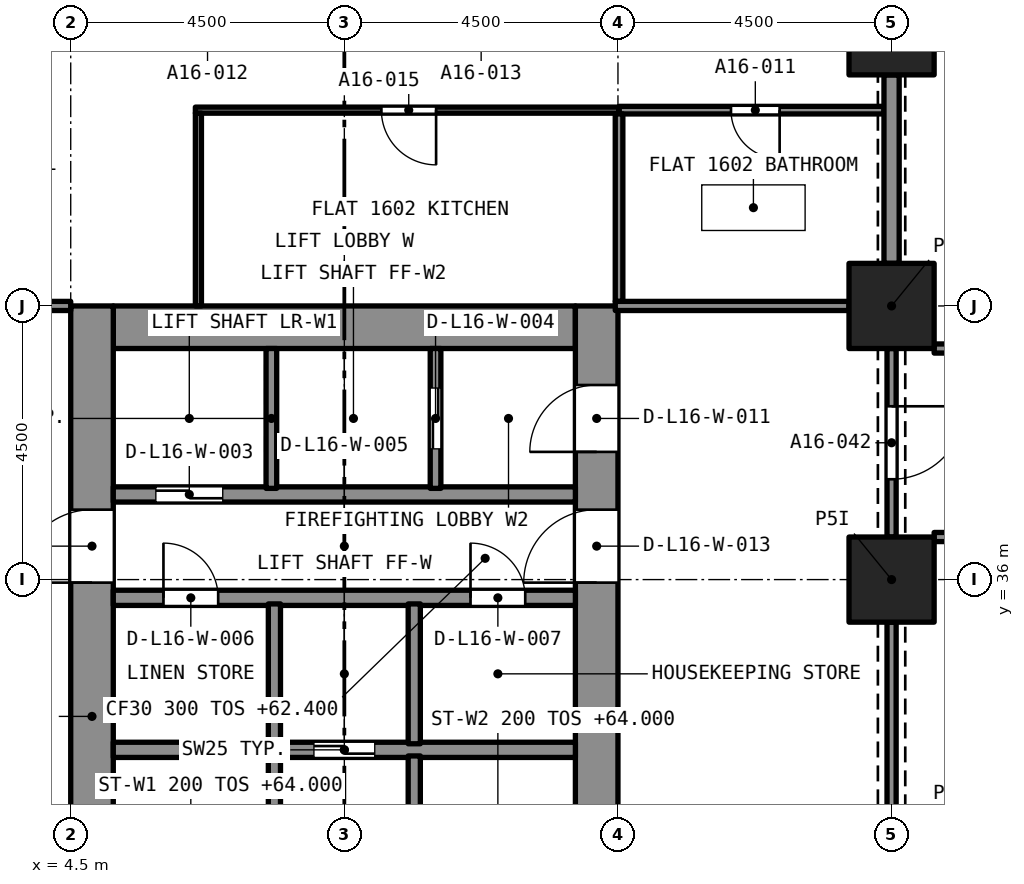
"""IFC4 building model, lengths in metres.
Left out: names, types, materials, properties, quantities, classifications, styles, units other than length and angle.
Written with IfcOpenShell. Run it as: python <this file> out.ifc"""

import sys

from ifc_helpers import new_model, si_unit, direction, frame, frame_2d, origin, origin_2d, place, context, subcontext, project, spatial, rectangle, extrude, element, fill, save


model = new_model("IFC4")
c1 = context("Model", 3, precision=1e-05, world=origin(), true_north=direction((0.0, 1.0)))
c2 = subcontext(c1, "Body", "Model", "MODEL_VIEW")
j1 = project(units=[si_unit("LENGTHUNIT", "METRE"), si_unit("PLANEANGLEUNIT", "RADIAN")], contexts=[c1])
p1 = place(None, origin())
s1 = spatial("IfcSite", under=j1, at=p1, CompositionType="ELEMENT")
p2 = place(p1, origin())
s2 = spatial("IfcBuilding", under=s1, at=p2, CompositionType="ELEMENT")
p3 = place(p2, frame((0.0, 0.0, 62.4)))
s3 = spatial("IfcBuildingStorey", under=s2, at=p3, CompositionType="ELEMENT", Elevation=62.4)
for number, where, z_axis, x_axis in (
    (1, (18.0, 36.0, 0.0), (0.0, 0.0, 1.0), (1.0, 0.0, 0.0)),
    (2, (18.0, 40.5, 0.0), (0.0, 0.0, 1.0), (1.0, 0.0, 0.0)),
    (3, (18.0, 45.0, 0.0), (0.0, 0.0, 1.0), (1.0, 0.0, 0.0)),
):
    element("IfcColumn", number, at=place(p3, frame(where, z_axis=z_axis, x_axis=x_axis)), inside=s3, PredefinedType="COLUMN", context=c2, shape_type="SweptSolid", body=[
        extrude(rectangle(XDim=1.4, YDim=1.4, at=origin_2d()), origin(), (0.0, 0.0, 1.0), 3.2),
    ])
p4 = place(p3, frame((5.2, 40.15, 0.0), z_axis=(0.0, 0.0, 1.0), x_axis=(1.0, 0.0, 0.0)))
e4 = element("IfcWall", 4, at=p4, inside=s3, PredefinedType="SOLIDWALL", context=c2, shape_type="SweptSolid", body=[
    extrude(rectangle(XDim=7.6, YDim=0.7, at=frame_2d((3.8, 0.0))), origin(), (0.0, 0.0, 1.0), 3.2),
])
p5 = place(p3, frame((4.85, 27.0, 0.0), z_axis=(0.0, 0.0, 1.0), x_axis=(0.0, 1.0, 0.0)))
e5 = element("IfcWall", 5, at=p5, inside=s3, PredefinedType="SOLIDWALL", context=c2, shape_type="SweptSolid", body=[
    extrude(rectangle(XDim=13.5, YDim=0.7, at=frame_2d((6.75, 0.0))), origin(), (0.0, 0.0, 1.0), 3.2),
])
p6 = place(p5, frame((8.95, 0.0, 0.0)))
e6 = element("IfcOpeningElement", 6, at=p6, cuts=e5, PredefinedType="OPENING", context=c2, shape_type="SweptSolid", body=[
    extrude(rectangle(XDim=1.2, YDim=2.1, at=frame_2d((0.6, 1.05))), frame((0.0, 0.36, 0.0), z_axis=(0.0, -1.0, 0.0), x_axis=(1.0, 0.0, 0.0)), (0.0, 0.0, 1.0), 0.72),
])
p7 = place(p3, frame((13.15, 27.0, 0.0), z_axis=(0.0, 0.0, 1.0), x_axis=(0.0, 1.0, 0.0)))
e7 = element("IfcWall", 7, at=p7, inside=s3, PredefinedType="SOLIDWALL", context=c2, shape_type="SweptSolid", body=[
    extrude(rectangle(XDim=13.5, YDim=0.7, at=frame_2d((6.75, 0.0))), origin(), (0.0, 0.0, 1.0), 3.2),
])
p8 = place(p7, frame((11.1, 0.0, 0.0)))
e8 = element("IfcOpeningElement", 8, at=p8, cuts=e7, PredefinedType="OPENING", context=c2, shape_type="SweptSolid", body=[
    extrude(rectangle(XDim=1.1, YDim=2.1, at=frame_2d((0.55, 1.05))), frame((0.0, 0.36, 0.0), z_axis=(0.0, -1.0, 0.0), x_axis=(1.0, 0.0, 0.0)), (0.0, 0.0, 1.0), 0.72),
])
p9 = place(p7, frame((8.95, 0.0, 0.0)))
e9 = element("IfcOpeningElement", 9, at=p9, cuts=e7, PredefinedType="OPENING", context=c2, shape_type="SweptSolid", body=[
    extrude(rectangle(XDim=1.2, YDim=2.1, at=frame_2d((0.6, 1.05))), frame((0.0, 0.36, 0.0), z_axis=(0.0, -1.0, 0.0), x_axis=(1.0, 0.0, 0.0)), (0.0, 0.0, 1.0), 0.72),
])
p10 = place(p3, frame((17.875, 43.72, 0.0), z_axis=(0.0, 0.0, 1.0), x_axis=(-1.0, 0.0, 0.0)))
e10 = element("IfcWall", 10, at=p10, inside=s3, PredefinedType="PARTITIONING", context=c2, shape_type="SweptSolid", body=[
    extrude(rectangle(XDim=4.357, YDim=0.125, at=frame_2d((2.178, 0.0))), origin(), (0.0, 0.0, 1.0), 2.9),
])
p11 = place(p10, frame((1.716, 0.0, 0.0)))
e11 = element("IfcOpeningElement", 11, at=p11, cuts=e10, PredefinedType="OPENING", context=c2, shape_type="SweptSolid", body=[
    extrude(rectangle(XDim=0.8, YDim=2.1, at=frame_2d((0.4, 1.05))), frame((0.0, 0.073, 0.0), z_axis=(0.0, -1.0, 0.0), x_axis=(1.0, 0.0, 0.0)), (0.0, 0.0, 1.0), 0.145),
])
p12 = place(p3, frame((13.518, 40.575, 0.0), z_axis=(0.0, 0.0, 1.0), x_axis=(0.0, 1.0, 0.0)))
e12 = element("IfcWall", 12, at=p12, inside=s3, PredefinedType="PARTITIONING", context=c2, shape_type="SweptSolid", body=[
    extrude(rectangle(XDim=3.083, YDim=0.125, at=frame_2d((1.541, 0.0))), origin(), (0.0, 0.0, 1.0), 2.9),
])
p13 = place(p3, frame((18.0, 41.2, 0.0), z_axis=(0.0, 0.0, 1.0), x_axis=(0.0, 1.0, 0.0)))
e13 = element("IfcWall", 13, at=p13, inside=s3, PredefinedType="PARTITIONING", context=c2, shape_type="SweptSolid", body=[
    extrude(rectangle(XDim=3.1, YDim=0.25, at=frame_2d((1.55, 0.0))), origin(), (0.0, 0.0, 1.0), 2.38),
])
p14 = place(p3, frame((13.456, 40.5, 0.0), z_axis=(0.0, 0.0, 1.0), x_axis=(1.0, 0.0, 0.0)))
e14 = element("IfcWall", 14, at=p14, inside=s3, PredefinedType="PARTITIONING", context=c2, shape_type="SweptSolid", body=[
    extrude(rectangle(XDim=3.844, YDim=0.15, at=frame_2d((1.922, 0.0))), origin(), (0.0, 0.0, 1.0), 2.9),
])
p15 = place(p3, frame((13.518, 43.72, 0.0), z_axis=(0.0, 0.0, 1.0), x_axis=(-1.0, 0.0, 0.0)))
e15 = element("IfcWall", 15, at=p15, inside=s3, PredefinedType="PARTITIONING", context=c2, shape_type="SweptSolid", body=[
    extrude(rectangle(XDim=6.968, YDim=0.1, at=frame_2d((3.484, 0.0))), origin(), (0.0, 0.0, 1.0), 2.9),
])
p16 = place(p15, frame((3.009, 0.0, 0.0)))
e16 = element("IfcOpeningElement", 16, at=p16, cuts=e15, PredefinedType="OPENING", context=c2, shape_type="SweptSolid", body=[
    extrude(rectangle(XDim=0.9, YDim=2.1, at=frame_2d((0.45, 1.05))), frame((0.0, 0.06, 0.0), z_axis=(0.0, -1.0, 0.0), x_axis=(1.0, 0.0, 0.0)), (0.0, 0.0, 1.0), 0.12),
])
p17 = place(p3, frame((6.6, 40.5, 0.0), z_axis=(0.0, 0.0, 1.0), x_axis=(0.0, 1.0, 0.0)))
e17 = element("IfcWall", 17, at=p17, inside=s3, PredefinedType="PARTITIONING", context=c2, shape_type="SweptSolid", body=[
    extrude(rectangle(XDim=3.17, YDim=0.1, at=frame_2d((1.585, 0.0))), origin(), (0.0, 0.0, 1.0), 2.9),
])
p18 = place(p3, frame((0.7, 40.5, 0.0), z_axis=(0.0, 0.0, 1.0), x_axis=(1.0, 0.0, 0.0)))
e18 = element("IfcWall", 18, at=p18, inside=s3, PredefinedType="PARTITIONING", context=c2, shape_type="SweptSolid", body=[
    extrude(rectangle(XDim=3.8, YDim=0.15, at=frame_2d((1.9, 0.0))), origin(), (0.0, 0.0, 1.0), 2.9),
])
p19 = place(p18, frame((1.05, 0.0, 0.0)))
e19 = element("IfcOpeningElement", 19, at=p19, cuts=e18, PredefinedType="OPENING", context=c2, shape_type="SweptSolid", body=[
    extrude(rectangle(XDim=1.0, YDim=2.1, at=frame_2d((0.5, 1.05))), frame((0.0, 0.085, 0.0), z_axis=(0.0, -1.0, 0.0), x_axis=(1.0, 0.0, 0.0)), (0.0, 0.0, 1.0), 0.17),
])
p20 = place(p3, frame((18.7, 39.8, 0.0), z_axis=(0.0, 0.0, 1.0), x_axis=(1.0, 0.0, 0.0)))
e20 = element("IfcWall", 20, at=p20, inside=s3, PredefinedType="PARTITIONING", context=c2, shape_type="SweptSolid", body=[
    extrude(rectangle(XDim=8.3, YDim=0.15, at=frame_2d((4.15, 0.0))), origin(), (0.0, 0.0, 1.0), 2.75),
])
p21 = place(p20, frame((3.3, 0.0, 0.0)))
e21 = element("IfcOpeningElement", 21, at=p21, cuts=e20, PredefinedType="OPENING", context=c2, shape_type="SweptSolid", body=[
    extrude(rectangle(XDim=1.0, YDim=2.1, at=frame_2d((0.5, 1.05))), frame((0.0, 0.085, 0.0), z_axis=(0.0, -1.0, 0.0), x_axis=(1.0, 0.0, 0.0)), (0.0, 0.0, 1.0), 0.17),
])
p22 = place(p3, frame((30.8, 36.7, 0.0), z_axis=(0.0, 0.0, 1.0), x_axis=(-1.0, 0.0, 0.0)))
e22 = element("IfcWall", 22, at=p22, inside=s3, PredefinedType="PARTITIONING", context=c2, shape_type="SweptSolid", body=[
    extrude(rectangle(XDim=12.1, YDim=0.15, at=frame_2d((6.05, 0.0))), origin(), (0.0, 0.0, 1.0), 2.75),
])
p23 = place(p22, frame((5.55, 0.0, 0.0)))
e23 = element("IfcOpeningElement", 23, at=p23, cuts=e22, PredefinedType="OPENING", context=c2, shape_type="SweptSolid", body=[
    extrude(rectangle(XDim=1.0, YDim=2.1, at=frame_2d((0.5, 1.05))), frame((0.0, 0.085, 0.0), z_axis=(0.0, -1.0, 0.0), x_axis=(1.0, 0.0, 0.0)), (0.0, 0.0, 1.0), 0.17),
])
p24 = place(p3, frame((18.0, 39.8, 0.0), z_axis=(0.0, 0.0, 1.0), x_axis=(0.0, -1.0, 0.0)))
e24 = element("IfcWall", 24, at=p24, inside=s3, PredefinedType="PARTITIONING", context=c2, shape_type="SweptSolid", body=[
    extrude(rectangle(XDim=3.1, YDim=0.15, at=frame_2d((1.55, 0.0))), origin(), (0.0, 0.0, 1.0), 2.38),
])
p25 = place(p24, frame((0.95, 0.0, 0.0)))
e25 = element("IfcOpeningElement", 25, at=p25, cuts=e24, PredefinedType="OPENING", context=c2, shape_type="SweptSolid", body=[
    extrude(rectangle(XDim=1.2, YDim=2.1, at=frame_2d((0.6, 1.05))), frame((0.0, 0.085, 0.0), z_axis=(0.0, -1.0, 0.0), x_axis=(1.0, 0.0, 0.0)), (0.0, 0.0, 1.0), 0.17),
])
p26 = place(p3, frame((18.0, 32.2, 0.0), z_axis=(0.0, 0.0, 1.0), x_axis=(0.0, 1.0, 0.0)))
e26 = element("IfcWall", 26, at=p26, inside=s3, PredefinedType="PARTITIONING", context=c2, shape_type="SweptSolid", body=[
    extrude(rectangle(XDim=3.1, YDim=0.15, at=frame_2d((1.55, 0.0))), origin(), (0.0, 0.0, 1.0), 2.38),
])
p27 = place(p3, frame((5.2, 33.2, 0.0), z_axis=(0.0, 0.0, 1.0), x_axis=(1.0, 0.0, 0.0)))
e27 = element("IfcWall", 27, at=p27, inside=s3, PredefinedType="SOLIDWALL", context=c2, shape_type="SweptSolid", body=[
    extrude(rectangle(XDim=7.6, YDim=0.25, at=frame_2d((3.8, 0.0))), origin(), (0.0, 0.0, 1.0), 2.9),
])
p28 = place(p27, frame((3.3, 0.0, 0.0)))
e28 = element("IfcOpeningElement", 28, at=p28, cuts=e27, PredefinedType="OPENING", context=c2, shape_type="SweptSolid", body=[
    extrude(rectangle(XDim=1.0, YDim=2.1, at=frame_2d((0.5, 1.05))), frame((0.0, 0.135, 0.0), z_axis=(0.0, -1.0, 0.0), x_axis=(1.0, 0.0, 0.0)), (0.0, 0.0, 1.0), 0.27),
])
p29 = place(p3, frame((5.2, 35.7, 0.0), z_axis=(0.0, 0.0, 1.0), x_axis=(1.0, 0.0, 0.0)))
e29 = element("IfcWall", 29, at=p29, inside=s3, PredefinedType="SOLIDWALL", context=c2, shape_type="SweptSolid", body=[
    extrude(rectangle(XDim=7.6, YDim=0.25, at=frame_2d((3.8, 0.0))), origin(), (0.0, 0.0, 1.0), 2.9),
])
p30 = place(p29, frame((0.825, 0.0, 0.0)))
e30 = element("IfcOpeningElement", 30, at=p30, cuts=e29, PredefinedType="OPENING", context=c2, shape_type="SweptSolid", body=[
    extrude(rectangle(XDim=0.9, YDim=2.1, at=frame_2d((0.45, 1.05))), frame((0.0, 0.135, 0.0), z_axis=(0.0, -1.0, 0.0), x_axis=(1.0, 0.0, 0.0)), (0.0, 0.0, 1.0), 0.27),
])
p31 = place(p29, frame((5.875, 0.0, 0.0)))
e31 = element("IfcOpeningElement", 31, at=p31, cuts=e29, PredefinedType="OPENING", context=c2, shape_type="SweptSolid", body=[
    extrude(rectangle(XDim=0.9, YDim=2.1, at=frame_2d((0.45, 1.05))), frame((0.0, 0.135, 0.0), z_axis=(0.0, -1.0, 0.0), x_axis=(1.0, 0.0, 0.0)), (0.0, 0.0, 1.0), 0.27),
])
p32 = place(p3, frame((5.2, 37.4, 0.0), z_axis=(0.0, 0.0, 1.0), x_axis=(1.0, 0.0, 0.0)))
e32 = element("IfcWall", 32, at=p32, inside=s3, PredefinedType="SOLIDWALL", context=c2, shape_type="SweptSolid", body=[
    extrude(rectangle(XDim=7.6, YDim=0.25, at=frame_2d((3.8, 0.0))), origin(), (0.0, 0.0, 1.0), 2.9),
])
p33 = place(p32, frame((0.7, 0.0, 0.0)))
e33 = element("IfcOpeningElement", 33, at=p33, cuts=e32, PredefinedType="OPENING", context=c2, shape_type="SweptSolid", body=[
    extrude(rectangle(XDim=1.1, YDim=2.4, at=frame_2d((0.55, 1.2))), frame((0.0, 0.135, 0.0), z_axis=(0.0, -1.0, 0.0), x_axis=(1.0, 0.0, 0.0)), (0.0, 0.0, 1.0), 0.27),
])
p34 = place(p3, frame((7.85, 27.7, 0.0), z_axis=(0.0, 0.0, 1.0), x_axis=(0.0, 1.0, 0.0)))
e34 = element("IfcWall", 34, at=p34, inside=s3, PredefinedType="SOLIDWALL", context=c2, shape_type="SweptSolid", body=[
    extrude(rectangle(XDim=5.4, YDim=0.2, at=frame_2d((2.7, 0.0))), origin(), (0.0, 0.0, 1.0), 2.9),
])
p35 = place(p34, frame((0.2, 0.0, 0.0)))
e35 = element("IfcOpeningElement", 35, at=p35, cuts=e34, PredefinedType="OPENING", context=c2, shape_type="SweptSolid", body=[
    extrude(rectangle(XDim=0.9, YDim=2.1, at=frame_2d((0.45, 1.05))), frame((0.0, 0.11, 0.0), z_axis=(0.0, -1.0, 0.0), x_axis=(1.0, 0.0, 0.0)), (0.0, 0.0, 1.0), 0.22),
])
p36 = place(p3, frame((10.15, 27.7, 0.0), z_axis=(0.0, 0.0, 1.0), x_axis=(0.0, 1.0, 0.0)))
e36 = element("IfcWall", 36, at=p36, inside=s3, PredefinedType="SOLIDWALL", context=c2, shape_type="SweptSolid", body=[
    extrude(rectangle(XDim=5.4, YDim=0.2, at=frame_2d((2.7, 0.0))), origin(), (0.0, 0.0, 1.0), 2.9),
])
p37 = place(p36, frame((0.2, 0.0, 0.0)))
e37 = element("IfcOpeningElement", 37, at=p37, cuts=e36, PredefinedType="OPENING", context=c2, shape_type="SweptSolid", body=[
    extrude(rectangle(XDim=0.9, YDim=2.1, at=frame_2d((0.45, 1.05))), frame((0.0, 0.11, 0.0), z_axis=(0.0, -1.0, 0.0), x_axis=(1.0, 0.0, 0.0)), (0.0, 0.0, 1.0), 0.22),
])
for number, where, z_axis, x_axis in (
    (38, (7.85, 33.3, 0.0), (0.0, 0.0, 1.0), (0.0, 1.0, 0.0)),
    (39, (10.15, 33.3, 0.0), (0.0, 0.0, 1.0), (0.0, 1.0, 0.0)),
):
    element("IfcWall", number, at=place(p3, frame(where, z_axis=z_axis, x_axis=x_axis)), inside=s3, PredefinedType="SOLIDWALL", context=c2, shape_type="SweptSolid", body=[
        extrude(rectangle(XDim=2.3, YDim=0.2, at=frame_2d((1.15, 0.0))), origin(), (0.0, 0.0, 1.0), 2.9),
    ])
p38 = place(p3, frame((7.8, 37.5, 0.0), z_axis=(0.0, 0.0, 1.0), x_axis=(0.0, 1.0, 0.0)))
e40 = element("IfcWall", 40, at=p38, inside=s3, PredefinedType="SOLIDWALL", context=c2, shape_type="SweptSolid", body=[
    extrude(rectangle(XDim=2.3, YDim=0.175, at=frame_2d((1.15, 0.0))), origin(), (0.0, 0.0, 1.0), 2.9),
])
p39 = place(p3, frame((10.5, 37.5, 0.0), z_axis=(0.0, 0.0, 1.0), x_axis=(0.0, 1.0, 0.0)))
e41 = element("IfcWall", 41, at=p39, inside=s3, PredefinedType="SOLIDWALL", context=c2, shape_type="SweptSolid", body=[
    extrude(rectangle(XDim=2.3, YDim=0.175, at=frame_2d((1.15, 0.0))), origin(), (0.0, 0.0, 1.0), 2.9),
])
p40 = place(p39, frame((0.65, 0.0, 0.0)))
e42 = element("IfcOpeningElement", 42, at=p40, cuts=e41, PredefinedType="OPENING", context=c2, shape_type="SweptSolid", body=[
    extrude(rectangle(XDim=1.0, YDim=2.1, at=frame_2d((0.5, 1.05))), frame((0.0, 0.097, 0.0), z_axis=(0.0, -1.0, 0.0), x_axis=(1.0, 0.0, 0.0)), (0.0, 0.0, 1.0), 0.195),
])
p41 = place(p11, origin())
e43 = element("IfcDoor", 43, at=p41, inside=s3, OperationType="SINGLE_SWING_LEFT", PredefinedType="DOOR", context=c2, shape_type="SweptSolid", body=[
    extrude(rectangle(XDim=0.8, YDim=2.1, at=frame_2d((0.4, 1.05))), frame((0.0, 0.025, 0.0), z_axis=(0.0, -1.0, 0.0), x_axis=(1.0, 0.0, 0.0)), (0.0, 0.0, 1.0), 0.05),
])
fill(e11, e43)
p42 = place(p16, origin())
e44 = element("IfcDoor", 44, at=p42, inside=s3, OperationType="SINGLE_SWING_LEFT", PredefinedType="DOOR", context=c2, shape_type="SweptSolid", body=[
    extrude(rectangle(XDim=0.9, YDim=2.1, at=frame_2d((0.45, 1.05))), frame((0.0, 0.025, 0.0), z_axis=(0.0, -1.0, 0.0), x_axis=(1.0, 0.0, 0.0)), (0.0, 0.0, 1.0), 0.05),
])
fill(e16, e44)
p43 = place(p25, origin())
e45 = element("IfcDoor", 45, at=p43, inside=s3, OperationType="SINGLE_SWING_LEFT", PredefinedType="DOOR", context=c2, shape_type="SweptSolid", body=[
    extrude(rectangle(XDim=1.2, YDim=2.1, at=frame_2d((0.6, 1.05))), frame((0.0, 0.025, 0.0), z_axis=(0.0, -1.0, 0.0), x_axis=(1.0, 0.0, 0.0)), (0.0, 0.0, 1.0), 0.05),
])
fill(e25, e45)
p44 = place(p33, origin())
e46 = element("IfcDoor", 46, at=p44, inside=s3, OperationType="SLIDING_TO_LEFT", PredefinedType="DOOR", context=c2, shape_type="SweptSolid", body=[
    extrude(rectangle(XDim=1.1, YDim=2.4, at=frame_2d((0.55, 1.2))), frame((0.0, 0.025, 0.0), z_axis=(0.0, -1.0, 0.0), x_axis=(1.0, 0.0, 0.0)), (0.0, 0.0, 1.0), 0.05),
])
fill(e33, e46)
p45 = place(p40, origin())
e47 = element("IfcDoor", 47, at=p45, inside=s3, OperationType="SLIDING_TO_LEFT", PredefinedType="DOOR", context=c2, shape_type="SweptSolid", body=[
    extrude(rectangle(XDim=1.0, YDim=2.1, at=frame_2d((0.5, 1.05))), frame((0.0, 0.025, 0.0), z_axis=(0.0, -1.0, 0.0), x_axis=(1.0, 0.0, 0.0)), (0.0, 0.0, 1.0), 0.05),
])
fill(e42, e47)
p46 = place(p28, origin())
e48 = element("IfcDoor", 48, at=p46, inside=s3, OperationType="SLIDING_TO_LEFT", PredefinedType="DOOR", context=c2, shape_type="SweptSolid", body=[
    extrude(rectangle(XDim=1.0, YDim=2.1, at=frame_2d((0.5, 1.05))), frame((0.0, 0.025, 0.0), z_axis=(0.0, -1.0, 0.0), x_axis=(1.0, 0.0, 0.0)), (0.0, 0.0, 1.0), 0.05),
])
fill(e28, e48)
p47 = place(p30, origin())
e49 = element("IfcDoor", 49, at=p47, inside=s3, OperationType="SINGLE_SWING_LEFT", PredefinedType="DOOR", context=c2, shape_type="SweptSolid", body=[
    extrude(rectangle(XDim=0.9, YDim=2.1, at=frame_2d((0.45, 1.05))), frame((0.0, 0.025, 0.0), z_axis=(0.0, -1.0, 0.0), x_axis=(1.0, 0.0, 0.0)), (0.0, 0.0, 1.0), 0.05),
])
fill(e30, e49)
p48 = place(p31, origin())
e50 = element("IfcDoor", 50, at=p48, inside=s3, OperationType="SINGLE_SWING_LEFT", PredefinedType="DOOR", context=c2, shape_type="SweptSolid", body=[
    extrude(rectangle(XDim=0.9, YDim=2.1, at=frame_2d((0.45, 1.05))), frame((0.0, 0.025, 0.0), z_axis=(0.0, -1.0, 0.0), x_axis=(1.0, 0.0, 0.0)), (0.0, 0.0, 1.0), 0.05),
])
fill(e31, e50)
p49 = place(p8, origin())
e51 = element("IfcDoor", 51, at=p49, inside=s3, OperationType="SINGLE_SWING_LEFT", PredefinedType="DOOR", context=c2, shape_type="SweptSolid", body=[
    extrude(rectangle(XDim=1.1, YDim=2.1, at=frame_2d((0.55, 1.05))), frame((0.0, 0.025, 0.0), z_axis=(0.0, -1.0, 0.0), x_axis=(1.0, 0.0, 0.0)), (0.0, 0.0, 1.0), 0.05),
])
fill(e8, e51)
p50 = place(p6, origin())
e52 = element("IfcDoor", 52, at=p50, inside=s3, OperationType="SINGLE_SWING_LEFT", PredefinedType="DOOR", context=c2, shape_type="SweptSolid", body=[
    extrude(rectangle(XDim=1.2, YDim=2.1, at=frame_2d((0.6, 1.05))), frame((0.0, 0.025, 0.0), z_axis=(0.0, -1.0, 0.0), x_axis=(1.0, 0.0, 0.0)), (0.0, 0.0, 1.0), 0.05),
])
fill(e6, e52)
p51 = place(p9, origin())
e53 = element("IfcDoor", 53, at=p51, inside=s3, OperationType="SINGLE_SWING_LEFT", PredefinedType="DOOR", context=c2, shape_type="SweptSolid", body=[
    extrude(rectangle(XDim=1.2, YDim=2.1, at=frame_2d((0.6, 1.05))), frame((0.0, 0.025, 0.0), z_axis=(0.0, -1.0, 0.0), x_axis=(1.0, 0.0, 0.0)), (0.0, 0.0, 1.0), 0.05),
])
fill(e9, e53)
save(model, sys.argv[1])
